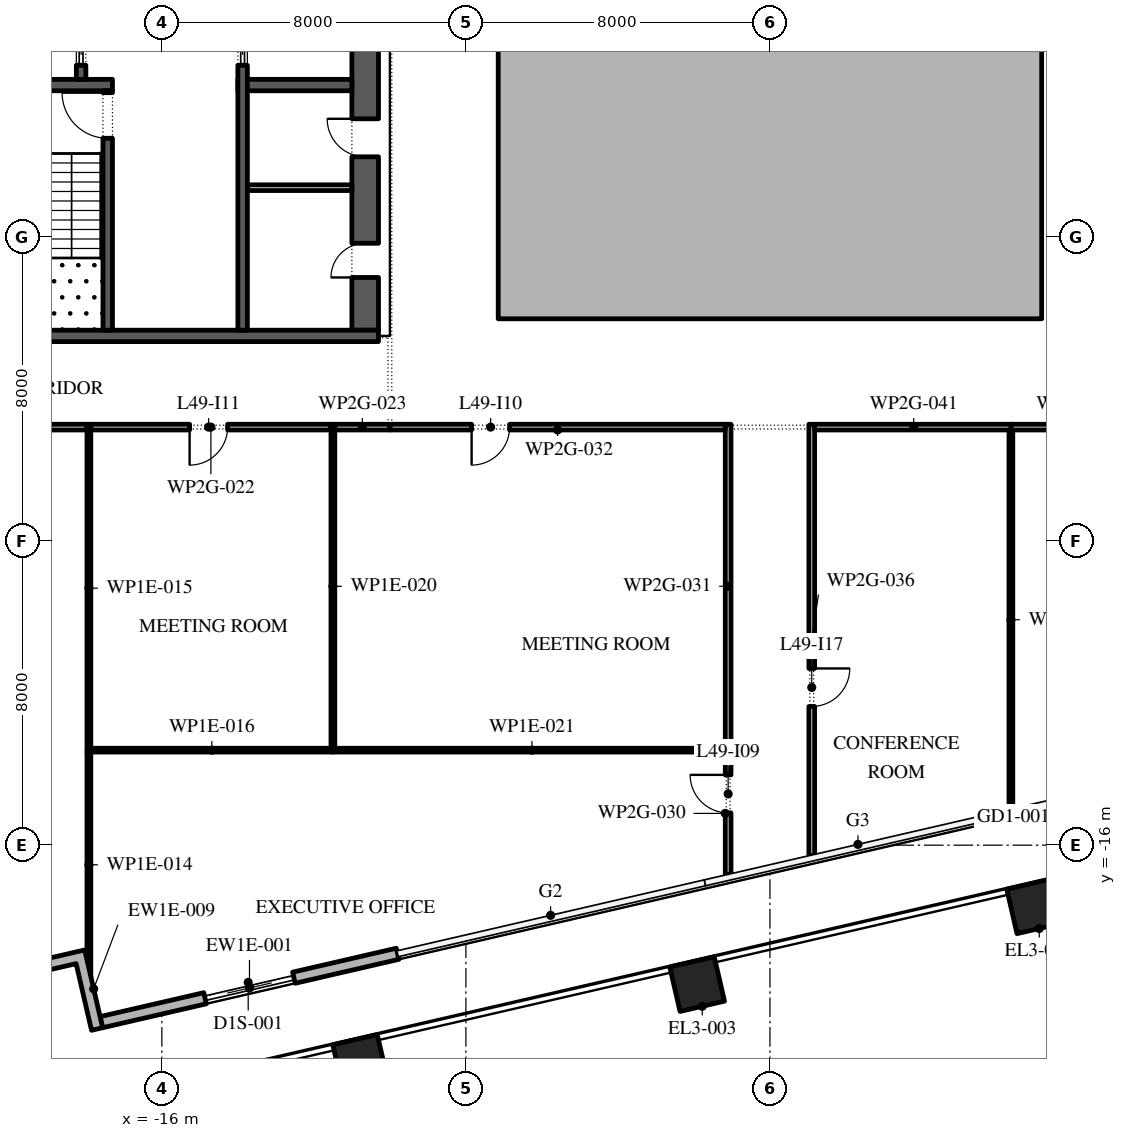
"""IFC4 building model, lengths in metres.
Left out: names, types, materials, properties, quantities, classifications, styles, units other than length and angle.
Written with IfcOpenShell. Run it as: python <this file> out.ifc"""

import sys

from ifc_helpers import new_model, si_unit, direction, frame, frame_2d, origin, origin_2d, place, context, subcontext, project, spatial, polyline, rectangle, outline, extrude, element, fill, save


model = new_model("IFC4")
c1 = context("Model", 3, precision=1e-05, world=origin(), true_north=direction((0.0, 1.0)))
c2 = subcontext(c1, "Body", "Model", "MODEL_VIEW")
j1 = project(units=[si_unit("LENGTHUNIT", "METRE"), si_unit("PLANEANGLEUNIT", "RADIAN")], contexts=[c1])
p1 = place(None, origin())
s1 = spatial("IfcSite", under=j1, at=p1, CompositionType="ELEMENT")
p2 = place(p1, origin())
s2 = spatial("IfcBuilding", under=s1, at=p2, CompositionType="ELEMENT")
p3 = place(p2, frame((0.0, 0.0, 222.0)))
s3 = spatial("IfcBuildingStorey", under=s2, at=p3, CompositionType="ELEMENT", Elevation=222.0)
for number, where, z_axis, x_axis in (
    (1, (-10.782, -21.702, 0.0), (0.0, 0.0, 1.0), (0.974, 0.225, 0.0)),
    (2, (-1.916, -19.655, 0.0), (0.0, 0.0, 1.0), (0.974, 0.225, 0.0)),
    (3, (6.951, -17.608, 0.0), (0.0, 0.0, 1.0), (0.974, 0.225, 0.0)),
):
    element("IfcColumn", number, at=place(p3, frame(where, z_axis=z_axis, x_axis=x_axis)), inside=s3, PredefinedType="COLUMN", context=c2, shape_type="SweptSolid", body=[
        extrude(rectangle(XDim=1.2, YDim=1.2, at=origin_2d()), origin(), (0.0, 0.0, 1.0), 4.2),
    ])
p4 = place(p3, origin())
e4 = element("IfcWall", 4, at=p4, inside=s3, PredefinedType="STANDARD", context=c2, shape_type="SweptSolid", body=[
    extrude(outline(polyline([(-7.15, -2.15), (7.15, -2.15), (7.15, 16.15), (-7.15, 16.15), (-7.15, -2.15)]), holes=[polyline([(-7.0, -2.0), (-7.0, 16.0), (7.0, 16.0), (7.0, -2.0), (-7.0, -2.0)])]), origin(), (0.0, 0.0, 1.0), 3.75),
])
p5 = place(p3, frame((-17.592, -20.657, 0.0), z_axis=(0.0, 0.0, 1.0), x_axis=(0.974371132389, 0.224946429994, 0.0)))
e5 = element("IfcWall", 5, at=p5, inside=s3, PredefinedType="STANDARD", context=c2, shape_type="SweptSolid", body=[
    extrude(rectangle(XDim=8.0, YDim=0.3, at=frame_2d((4.0, 0.0))), origin(), (0.0, 0.0, 1.0), 3.75),
])
p6 = place(p5, frame((2.8, 0.0, 0.0)))
e6 = element("IfcOpeningElement", 6, at=p6, cuts=e5, PredefinedType="OPENING", context=c2, shape_type="SweptSolid", body=[
    extrude(rectangle(XDim=2.4, YDim=2.7, at=frame_2d((1.2, 1.35))), frame((0.0, 0.16, 0.0), z_axis=(0.0, -1.0, 0.0), x_axis=(1.0, 0.0, 0.0)), (0.0, 0.0, 1.0), 0.32),
])
p7 = place(p3, origin())
e7 = element("IfcWall", 7, at=p7, inside=s3, PredefinedType="STANDARD", context=c2, shape_type="SweptSolid", body=[
    extrude(outline(polyline([(-18.256, -19.117), (-20.01, -19.522), (-20.414, -17.768), (-21.876, -18.105), (-21.943, -17.813), (-20.19, -17.408), (-19.785, -19.162), (-18.031, -18.757), (-17.558, -20.803), (-17.851, -20.871), (-18.256, -19.117)])), origin(), (0.0, 0.0, 1.0), 3.75),
])
p8 = place(p3, frame((-10.65, -2.45, 0.0), z_axis=(0.0, 0.0, 1.0), x_axis=(0.0, 1.0, 0.0)))
e8 = element("IfcWall", 8, at=p8, inside=s3, PredefinedType="SHEAR", context=c2, shape_type="SweptSolid", body=[
    extrude(rectangle(XDim=27.9, YDim=0.7, at=frame_2d((13.95, 0.0))), origin(), (0.0, 0.0, 1.0), 3.75),
])
p9 = place(p8, frame((23.65, 0.0, 0.0)))
e9 = element("IfcOpeningElement", 9, at=p9, cuts=e8, PredefinedType="OPENING", context=c2, shape_type="SweptSolid", body=[
    extrude(rectangle(XDim=2.4, YDim=2.1, at=frame_2d((1.2, 1.05))), frame((0.0, 0.36, 0.0), z_axis=(0.0, -1.0, 0.0), x_axis=(1.0, 0.0, 0.0)), (0.0, 0.0, 1.0), 0.72),
])
p10 = place(p8, frame((1.387, 0.0, 0.0)))
e10 = element("IfcOpeningElement", 10, at=p10, cuts=e8, PredefinedType="OPENING", context=c2, shape_type="SweptSolid", body=[
    extrude(rectangle(XDim=0.9, YDim=2.1, at=frame_2d((0.45, 1.05))), frame((0.0, 0.36, 0.0), z_axis=(0.0, -1.0, 0.0), x_axis=(1.0, 0.0, 0.0)), (0.0, 0.0, 1.0), 0.72),
])
p11 = place(p8, frame((4.562, 0.0, 0.0)))
e11 = element("IfcOpeningElement", 11, at=p11, cuts=e8, PredefinedType="OPENING", context=c2, shape_type="SweptSolid", body=[
    extrude(rectangle(XDim=1.0, YDim=2.1, at=frame_2d((0.5, 1.05))), frame((0.0, 0.36, 0.0), z_axis=(0.0, -1.0, 0.0), x_axis=(1.0, 0.0, 0.0)), (0.0, 0.0, 1.0), 0.72),
])
p12 = place(p3, frame((-21.7, -2.6, 0.0), z_axis=(0.0, 0.0, 1.0), x_axis=(1.0, 0.0, 0.0)))
e12 = element("IfcWall", 12, at=p12, inside=s3, PredefinedType="SHEAR", context=c2, shape_type="SweptSolid", body=[
    extrude(rectangle(XDim=11.4, YDim=0.3, at=frame_2d((5.7, 0.0))), origin(), (0.0, 0.0, 1.0), 3.75),
])
p13 = place(p3, frame((-21.0, 4.0, 0.0), z_axis=(0.0, 0.0, 1.0), x_axis=(1.0, 0.0, 0.0)))
e13 = element("IfcWall", 13, at=p13, inside=s3, PredefinedType="SHEAR", context=c2, shape_type="SweptSolid", body=[
    extrude(rectangle(XDim=3.7, YDim=0.3, at=frame_2d((1.85, 0.0))), origin(), (0.0, 0.0, 1.0), 3.75),
])
p14 = place(p3, frame((-17.425, -2.45, 0.0), z_axis=(0.0, 0.0, 1.0), x_axis=(0.0, 1.0, 0.0)))
e14 = element("IfcWall", 14, at=p14, inside=s3, PredefinedType="SHEAR", context=c2, shape_type="SweptSolid", body=[
    extrude(rectangle(XDim=6.3, YDim=0.25, at=frame_2d((3.15, 0.0))), origin(), (0.0, 0.0, 1.0), 3.75),
])
p15 = place(p14, frame((5.05, 0.0, 0.0)))
e15 = element("IfcOpeningElement", 15, at=p15, cuts=e14, PredefinedType="OPENING", context=c2, shape_type="SweptSolid", body=[
    extrude(rectangle(XDim=1.2, YDim=2.1, at=frame_2d((0.6, 1.05))), frame((0.0, 0.135, 0.0), z_axis=(0.0, -1.0, 0.0), x_axis=(1.0, 0.0, 0.0)), (0.0, 0.0, 1.0), 0.27),
])
p16 = place(p3, frame((-18.125, 4.15, 0.0), z_axis=(0.0, 0.0, 1.0), x_axis=(0.0, 1.0, 0.0)))
e16 = element("IfcWall", 16, at=p16, inside=s3, PredefinedType="SHEAR", context=c2, shape_type="SweptSolid", body=[
    extrude(rectangle(XDim=14.7, YDim=0.25, at=frame_2d((7.35, 0.0))), origin(), (0.0, 0.0, 1.0), 3.75),
])
p17 = place(p16, frame((3.446, 0.0, 0.0)))
e17 = element("IfcOpeningElement", 17, at=p17, cuts=e16, PredefinedType="OPENING", context=c2, shape_type="SweptSolid", body=[
    extrude(rectangle(XDim=0.9, YDim=2.1, at=frame_2d((0.45, 1.05))), frame((0.0, 0.135, 0.0), z_axis=(0.0, -1.0, 0.0), x_axis=(1.0, 0.0, 0.0)), (0.0, 0.0, 1.0), 0.27),
])
p18 = place(p16, frame((6.9, 0.0, 0.0)))
e18 = element("IfcOpeningElement", 18, at=p18, cuts=e16, PredefinedType="OPENING", context=c2, shape_type="SweptSolid", body=[
    extrude(rectangle(XDim=0.9, YDim=2.1, at=frame_2d((0.45, 1.05))), frame((0.0, 0.135, 0.0), z_axis=(0.0, -1.0, 0.0), x_axis=(1.0, 0.0, 0.0)), (0.0, 0.0, 1.0), 0.27),
])
p19 = place(p16, frame((10.354, 0.0, 0.0)))
e19 = element("IfcOpeningElement", 19, at=p19, cuts=e16, PredefinedType="OPENING", context=c2, shape_type="SweptSolid", body=[
    extrude(rectangle(XDim=0.9, YDim=2.1, at=frame_2d((0.45, 1.05))), frame((0.0, 0.135, 0.0), z_axis=(0.0, -1.0, 0.0), x_axis=(1.0, 0.0, 0.0)), (0.0, 0.0, 1.0), 0.27),
])
p20 = place(p16, frame((0.371, 0.0, 0.0)))
e20 = element("IfcOpeningElement", 20, at=p20, cuts=e16, PredefinedType="OPENING", context=c2, shape_type="SweptSolid", body=[
    extrude(rectangle(XDim=1.1, YDim=2.1, at=frame_2d((0.55, 1.05))), frame((0.0, 0.135, 0.0), z_axis=(0.0, -1.0, 0.0), x_axis=(1.0, 0.0, 0.0)), (0.0, 0.0, 1.0), 0.27),
])
p21 = place(p16, frame((13.229, 0.0, 0.0)))
e21 = element("IfcOpeningElement", 21, at=p21, cuts=e16, PredefinedType="OPENING", context=c2, shape_type="SweptSolid", body=[
    extrude(rectangle(XDim=1.1, YDim=2.1, at=frame_2d((0.55, 1.05))), frame((0.0, 0.135, 0.0), z_axis=(0.0, -1.0, 0.0), x_axis=(1.0, 0.0, 0.0)), (0.0, 0.0, 1.0), 0.27),
])
p22 = place(p3, frame((-14.0, 4.0, 0.0), z_axis=(0.0, 0.0, 1.0), x_axis=(1.0, 0.0, 0.0)))
e22 = element("IfcWall", 22, at=p22, inside=s3, PredefinedType="SHEAR", context=c2, shape_type="SweptSolid", body=[
    extrude(rectangle(XDim=3.0, YDim=0.3, at=frame_2d((1.5, 0.0))), origin(), (0.0, 0.0, 1.0), 3.75),
])
p23 = place(p3, frame((-13.875, -2.45, 0.0), z_axis=(0.0, 0.0, 1.0), x_axis=(0.0, 1.0, 0.0)))
e23 = element("IfcWall", 23, at=p23, inside=s3, PredefinedType="SHEAR", context=c2, shape_type="SweptSolid", body=[
    extrude(rectangle(XDim=21.3, YDim=0.25, at=frame_2d((10.65, 0.0))), origin(), (0.0, 0.0, 1.0), 3.75),
])
p24 = place(p23, frame((17.786, 0.0, 0.0)))
e24 = element("IfcOpeningElement", 24, at=p24, cuts=e23, PredefinedType="OPENING", context=c2, shape_type="SweptSolid", body=[
    extrude(rectangle(XDim=0.9, YDim=2.1, at=frame_2d((0.45, 1.05))), frame((0.0, 0.135, 0.0), z_axis=(0.0, -1.0, 0.0), x_axis=(1.0, 0.0, 0.0)), (0.0, 0.0, 1.0), 0.27),
])
p25 = place(p23, frame((6.971, 0.0, 0.0)))
e25 = element("IfcOpeningElement", 25, at=p25, cuts=e23, PredefinedType="OPENING", context=c2, shape_type="SweptSolid", body=[
    extrude(rectangle(XDim=1.1, YDim=2.1, at=frame_2d((0.55, 1.05))), frame((0.0, 0.135, 0.0), z_axis=(0.0, -1.0, 0.0), x_axis=(1.0, 0.0, 0.0)), (0.0, 0.0, 1.0), 0.27),
])
p26 = place(p23, frame((9.114, 0.0, 0.0)))
e26 = element("IfcOpeningElement", 26, at=p26, cuts=e23, PredefinedType="OPENING", context=c2, shape_type="SweptSolid", body=[
    extrude(rectangle(XDim=1.1, YDim=2.1, at=frame_2d((0.55, 1.05))), frame((0.0, 0.135, 0.0), z_axis=(0.0, -1.0, 0.0), x_axis=(1.0, 0.0, 0.0)), (0.0, 0.0, 1.0), 0.27),
])
p27 = place(p23, frame((11.257, 0.0, 0.0)))
e27 = element("IfcOpeningElement", 27, at=p27, cuts=e23, PredefinedType="OPENING", context=c2, shape_type="SweptSolid", body=[
    extrude(rectangle(XDim=1.1, YDim=2.1, at=frame_2d((0.55, 1.05))), frame((0.0, 0.135, 0.0), z_axis=(0.0, -1.0, 0.0), x_axis=(1.0, 0.0, 0.0)), (0.0, 0.0, 1.0), 0.27),
])
p28 = place(p23, frame((13.4, 0.0, 0.0)))
e28 = element("IfcOpeningElement", 28, at=p28, cuts=e23, PredefinedType="OPENING", context=c2, shape_type="SweptSolid", body=[
    extrude(rectangle(XDim=1.1, YDim=2.1, at=frame_2d((0.55, 1.05))), frame((0.0, 0.135, 0.0), z_axis=(0.0, -1.0, 0.0), x_axis=(1.0, 0.0, 0.0)), (0.0, 0.0, 1.0), 0.27),
])
p29 = place(p3, frame((-13.75, 1.3, 0.0), z_axis=(0.0, 0.0, 1.0), x_axis=(1.0, 0.0, 0.0)))
e29 = element("IfcWall", 29, at=p29, inside=s3, PredefinedType="PARTITIONING", context=c2, shape_type="SweptSolid", body=[
    extrude(rectangle(XDim=2.75, YDim=0.15, at=frame_2d((1.375, 0.0))), origin(), (0.0, 0.0, 1.0), 3.75),
])
p30 = place(p3, frame((-17.92, -19.482, 0.0), z_axis=(0.0, 0.0, 1.0), x_axis=(0.0, 1.0, 0.0)))
e30 = element("IfcWall", 30, at=p30, inside=s3, PredefinedType="PARTITIONING", context=c2, shape_type="SweptSolid", body=[
    extrude(rectangle(XDim=5.932, YDim=0.1, at=frame_2d((2.966, 0.0))), origin(), (0.0, 0.0, 1.0), 3.75),
])
p31 = place(p3, frame((-17.92, -13.55, 0.0), z_axis=(0.0, 0.0, 1.0), x_axis=(0.0, 1.0, 0.0)))
e31 = element("IfcWall", 31, at=p31, inside=s3, PredefinedType="PARTITIONING", context=c2, shape_type="SweptSolid", body=[
    extrude(rectangle(XDim=8.625, YDim=0.1, at=frame_2d((4.312, 0.0))), origin(), (0.0, 0.0, 1.0), 3.75),
])
p32 = place(p3, frame((-17.87, -13.5, 0.0), z_axis=(0.0, 0.0, 1.0), x_axis=(1.0, 0.0, 0.0)))
e32 = element("IfcWall", 32, at=p32, inside=s3, PredefinedType="PARTITIONING", context=c2, shape_type="SweptSolid", body=[
    extrude(rectangle(XDim=6.37, YDim=0.1, at=frame_2d((3.185, 0.0))), origin(), (0.0, 0.0, 1.0), 3.75),
])
p33 = place(p3, frame((-17.97, -5.0, 0.0), z_axis=(0.0, 0.0, 1.0), x_axis=(-1.0, 0.0, 0.0)))
e33 = element("IfcWall", 33, at=p33, inside=s3, PredefinedType="PARTITIONING", context=c2, shape_type="SweptSolid", body=[
    extrude(rectangle(XDim=6.03, YDim=0.15, at=frame_2d((3.015, 0.0))), origin(), (0.0, 0.0, 1.0), 3.75),
])
p34 = place(p33, frame((3.13, 0.0, 0.0)))
e34 = element("IfcOpeningElement", 34, at=p34, cuts=e33, PredefinedType="OPENING", context=c2, shape_type="SweptSolid", body=[
    extrude(rectangle(XDim=1.0, YDim=2.1, at=frame_2d((0.5, 1.05))), frame((0.0, 0.085, 0.0), z_axis=(0.0, -1.0, 0.0), x_axis=(1.0, 0.0, 0.0)), (0.0, 0.0, 1.0), 0.17),
])
p35 = place(p3, frame((-11.5, -13.45, 0.0), z_axis=(0.0, 0.0, 1.0), x_axis=(0.0, 1.0, 0.0)))
e35 = element("IfcWall", 35, at=p35, inside=s3, PredefinedType="PARTITIONING", context=c2, shape_type="SweptSolid", body=[
    extrude(rectangle(XDim=8.525, YDim=0.1, at=frame_2d((4.262, 0.0))), origin(), (0.0, 0.0, 1.0), 3.75),
])
p36 = place(p3, frame((-11.5, -13.5, 0.0), z_axis=(0.0, 0.0, 1.0), x_axis=(1.0, 0.0, 0.0)))
e36 = element("IfcWall", 36, at=p36, inside=s3, PredefinedType="PARTITIONING", context=c2, shape_type="SweptSolid", body=[
    extrude(rectangle(XDim=10.475, YDim=0.1, at=frame_2d((5.238, 0.0))), origin(), (0.0, 0.0, 1.0), 3.75),
])
p37 = place(p3, frame((-11.55, -5.0, 0.0), z_axis=(0.0, 0.0, 1.0), x_axis=(-1.0, 0.0, 0.0)))
e37 = element("IfcWall", 37, at=p37, inside=s3, PredefinedType="PARTITIONING", context=c2, shape_type="SweptSolid", body=[
    extrude(rectangle(XDim=6.32, YDim=0.15, at=frame_2d((3.16, 0.0))), origin(), (0.0, 0.0, 1.0), 3.75),
])
p38 = place(p37, frame((2.72, 0.0, 0.0)))
e38 = element("IfcOpeningElement", 38, at=p38, cuts=e37, PredefinedType="OPENING", context=c2, shape_type="SweptSolid", body=[
    extrude(rectangle(XDim=1.0, YDim=2.1, at=frame_2d((0.5, 1.05))), frame((0.0, 0.085, 0.0), z_axis=(0.0, -1.0, 0.0), x_axis=(1.0, 0.0, 0.0)), (0.0, 0.0, 1.0), 0.17),
])
p39 = place(p3, frame((-10.0, -5.0, 0.0), z_axis=(0.0, 0.0, 1.0), x_axis=(-1.0, 0.0, 0.0)))
e39 = element("IfcWall", 39, at=p39, inside=s3, PredefinedType="PARTITIONING", context=c2, shape_type="SweptSolid", body=[
    extrude(rectangle(XDim=1.45, YDim=0.15, at=frame_2d((0.725, 0.0))), origin(), (0.0, 0.0, 1.0), 3.75),
])
p40 = place(p3, frame((-1.1, -16.778, 0.0), z_axis=(0.0, 0.0, 1.0), x_axis=(0.0, 1.0, 0.0)))
e40 = element("IfcWall", 40, at=p40, inside=s3, PredefinedType="PARTITIONING", context=c2, shape_type="SweptSolid", body=[
    extrude(rectangle(XDim=3.228, YDim=0.15, at=frame_2d((1.614, 0.0))), origin(), (0.0, 0.0, 1.0), 3.75),
])
p41 = place(p40, frame((1.628, 0.0, 0.0)))
e41 = element("IfcOpeningElement", 41, at=p41, cuts=e40, PredefinedType="OPENING", context=c2, shape_type="SweptSolid", body=[
    extrude(rectangle(XDim=1.0, YDim=2.1, at=frame_2d((0.5, 1.05))), frame((0.0, 0.085, 0.0), z_axis=(0.0, -1.0, 0.0), x_axis=(1.0, 0.0, 0.0)), (0.0, 0.0, 1.0), 0.17),
])
p42 = place(p3, frame((-1.1, -13.45, 0.0), z_axis=(0.0, 0.0, 1.0), x_axis=(0.0, 1.0, 0.0)))
e42 = element("IfcWall", 42, at=p42, inside=s3, PredefinedType="PARTITIONING", context=c2, shape_type="SweptSolid", body=[
    extrude(rectangle(XDim=8.525, YDim=0.15, at=frame_2d((4.262, 0.0))), origin(), (0.0, 0.0, 1.0), 3.75),
])
p43 = place(p3, frame((-1.175, -5.0, 0.0), z_axis=(0.0, 0.0, 1.0), x_axis=(-1.0, 0.0, 0.0)))
e43 = element("IfcWall", 43, at=p43, inside=s3, PredefinedType="PARTITIONING", context=c2, shape_type="SweptSolid", body=[
    extrude(rectangle(XDim=8.825, YDim=0.15, at=frame_2d((4.413, 0.0))), origin(), (0.0, 0.0, 1.0), 3.75),
])
p44 = place(p43, frame((5.675, 0.0, 0.0)))
e44 = element("IfcOpeningElement", 44, at=p44, cuts=e43, PredefinedType="OPENING", context=c2, shape_type="SweptSolid", body=[
    extrude(rectangle(XDim=1.0, YDim=2.1, at=frame_2d((0.5, 1.05))), frame((0.0, 0.085, 0.0), z_axis=(0.0, -1.0, 0.0), x_axis=(1.0, 0.0, 0.0)), (0.0, 0.0, 1.0), 0.17),
])
p45 = place(p3, frame((1.1, -4.925, 0.0), z_axis=(0.0, 0.0, 1.0), x_axis=(0.0, -1.0, 0.0)))
e45 = element("IfcWall", 45, at=p45, inside=s3, PredefinedType="PARTITIONING", context=c2, shape_type="SweptSolid", body=[
    extrude(rectangle(XDim=11.345, YDim=0.15, at=frame_2d((5.672, 0.0))), origin(), (0.0, 0.0, 1.0), 3.75),
])
p46 = place(p45, frame((6.425, 0.0, 0.0)))
e46 = element("IfcOpeningElement", 46, at=p46, cuts=e45, PredefinedType="OPENING", context=c2, shape_type="SweptSolid", body=[
    extrude(rectangle(XDim=1.0, YDim=2.1, at=frame_2d((0.5, 1.05))), frame((0.0, 0.085, 0.0), z_axis=(0.0, -1.0, 0.0), x_axis=(1.0, 0.0, 0.0)), (0.0, 0.0, 1.0), 0.17),
])
p47 = place(p3, frame((6.39, -5.0, 0.0), z_axis=(0.0, 0.0, 1.0), x_axis=(-1.0, 0.0, 0.0)))
e47 = element("IfcWall", 47, at=p47, inside=s3, PredefinedType="PARTITIONING", context=c2, shape_type="SweptSolid", body=[
    extrude(rectangle(XDim=5.215, YDim=0.15, at=frame_2d((2.607, 0.0))), origin(), (0.0, 0.0, 1.0), 3.75),
])
p48 = place(p3, frame((6.34, -5.075, 0.0), z_axis=(0.0, 0.0, 1.0), x_axis=(0.0, -1.0, 0.0)))
e48 = element("IfcWall", 48, at=p48, inside=s3, PredefinedType="PARTITIONING", context=c2, shape_type="SweptSolid", body=[
    extrude(rectangle(XDim=9.986, YDim=0.1, at=frame_2d((4.993, 0.0))), origin(), (0.0, 0.0, 1.0), 3.75),
])
p49 = place(p3, frame((10.0, -5.0, 0.0), z_axis=(0.0, 0.0, 1.0), x_axis=(-1.0, 0.0, 0.0)))
e49 = element("IfcWall", 49, at=p49, inside=s3, PredefinedType="PARTITIONING", context=c2, shape_type="SweptSolid", body=[
    extrude(rectangle(XDim=3.66, YDim=0.15, at=frame_2d((1.83, 0.0))), origin(), (0.0, 0.0, 1.0), 3.75),
])
p50 = place(p6, origin())
e50 = element("IfcDoor", 50, at=p50, inside=s3, OperationType="DOUBLE_DOOR_SLIDING", PredefinedType="DOOR", context=c2, shape_type="SweptSolid", body=[
    extrude(rectangle(XDim=2.4, YDim=2.7, at=frame_2d((1.2, 1.35))), frame((0.0, 0.025, 0.0), z_axis=(0.0, -1.0, 0.0), x_axis=(1.0, 0.0, 0.0)), (0.0, 0.0, 1.0), 0.05),
])
fill(e6, e50)
p51 = place(p20, origin())
e51 = element("IfcDoor", 51, at=p51, inside=s3, OperationType="SLIDING_TO_LEFT", PredefinedType="DOOR", context=c2, shape_type="SweptSolid", body=[
    extrude(rectangle(XDim=1.1, YDim=2.1, at=frame_2d((0.55, 1.05))), frame((0.0, 0.025, 0.0), z_axis=(0.0, -1.0, 0.0), x_axis=(1.0, 0.0, 0.0)), (0.0, 0.0, 1.0), 0.05),
])
fill(e20, e51)
p52 = place(p25, origin())
e52 = element("IfcDoor", 52, at=p52, inside=s3, OperationType="SLIDING_TO_LEFT", PredefinedType="DOOR", context=c2, shape_type="SweptSolid", body=[
    extrude(rectangle(XDim=1.1, YDim=2.1, at=frame_2d((0.55, 1.05))), frame((0.0, 0.025, 0.0), z_axis=(0.0, -1.0, 0.0), x_axis=(1.0, 0.0, 0.0)), (0.0, 0.0, 1.0), 0.05),
])
fill(e25, e52)
p53 = place(p15, origin())
e53 = element("IfcDoor", 53, at=p53, inside=s3, OperationType="SINGLE_SWING_LEFT", PredefinedType="DOOR", context=c2, shape_type="SweptSolid", body=[
    extrude(rectangle(XDim=1.2, YDim=2.1, at=frame_2d((0.6, 1.05))), frame((0.0, 0.025, 0.0), z_axis=(0.0, -1.0, 0.0), x_axis=(1.0, 0.0, 0.0)), (0.0, 0.0, 1.0), 0.05),
])
fill(e15, e53)
p54 = place(p10, origin())
e54 = element("IfcDoor", 54, at=p54, inside=s3, OperationType="SINGLE_SWING_RIGHT", PredefinedType="DOOR", context=c2, shape_type="SweptSolid", body=[
    extrude(rectangle(XDim=0.9, YDim=2.1, at=frame_2d((0.45, 1.05))), frame((0.0, 0.35, 0.0), z_axis=(0.0, -1.0, 0.0), x_axis=(1.0, 0.0, 0.0)), (0.0, 0.0, 1.0), 0.05),
])
fill(e10, e54)
p55 = place(p11, origin())
e55 = element("IfcDoor", 55, at=p55, inside=s3, OperationType="SINGLE_SWING_LEFT", PredefinedType="DOOR", context=c2, shape_type="SweptSolid", body=[
    extrude(rectangle(XDim=1.0, YDim=2.1, at=frame_2d((0.5, 1.05))), frame((0.0, 0.35, 0.0), z_axis=(0.0, -1.0, 0.0), x_axis=(1.0, 0.0, 0.0)), (0.0, 0.0, 1.0), 0.05),
])
fill(e11, e55)
p56 = place(p41, origin())
e56 = element("IfcDoor", 56, at=p56, inside=s3, OperationType="SINGLE_SWING_LEFT", PredefinedType="DOOR", context=c2, shape_type="SweptSolid", body=[
    extrude(rectangle(XDim=1.0, YDim=2.1, at=frame_2d((0.5, 1.05))), frame((0.0, 0.025, 0.0), z_axis=(0.0, -1.0, 0.0), x_axis=(1.0, 0.0, 0.0)), (0.0, 0.0, 1.0), 0.05),
])
fill(e41, e56)
p57 = place(p44, origin())
e57 = element("IfcDoor", 57, at=p57, inside=s3, OperationType="SINGLE_SWING_LEFT", PredefinedType="DOOR", context=c2, shape_type="SweptSolid", body=[
    extrude(rectangle(XDim=1.0, YDim=2.1, at=frame_2d((0.5, 1.05))), frame((0.0, 0.025, 0.0), z_axis=(0.0, -1.0, 0.0), x_axis=(1.0, 0.0, 0.0)), (0.0, 0.0, 1.0), 0.05),
])
fill(e44, e57)
p58 = place(p38, origin())
e58 = element("IfcDoor", 58, at=p58, inside=s3, OperationType="SINGLE_SWING_LEFT", PredefinedType="DOOR", context=c2, shape_type="SweptSolid", body=[
    extrude(rectangle(XDim=1.0, YDim=2.1, at=frame_2d((0.5, 1.05))), frame((0.0, 0.025, 0.0), z_axis=(0.0, -1.0, 0.0), x_axis=(1.0, 0.0, 0.0)), (0.0, 0.0, 1.0), 0.05),
])
fill(e38, e58)
p59 = place(p46, origin())
e59 = element("IfcDoor", 59, at=p59, inside=s3, OperationType="SINGLE_SWING_RIGHT", PredefinedType="DOOR", context=c2, shape_type="SweptSolid", body=[
    extrude(rectangle(XDim=1.0, YDim=2.1, at=frame_2d((0.5, 1.05))), frame((0.0, 0.025, 0.0), z_axis=(0.0, -1.0, 0.0), x_axis=(1.0, 0.0, 0.0)), (0.0, 0.0, 1.0), 0.05),
])
fill(e46, e59)
save(model, sys.argv[1])
